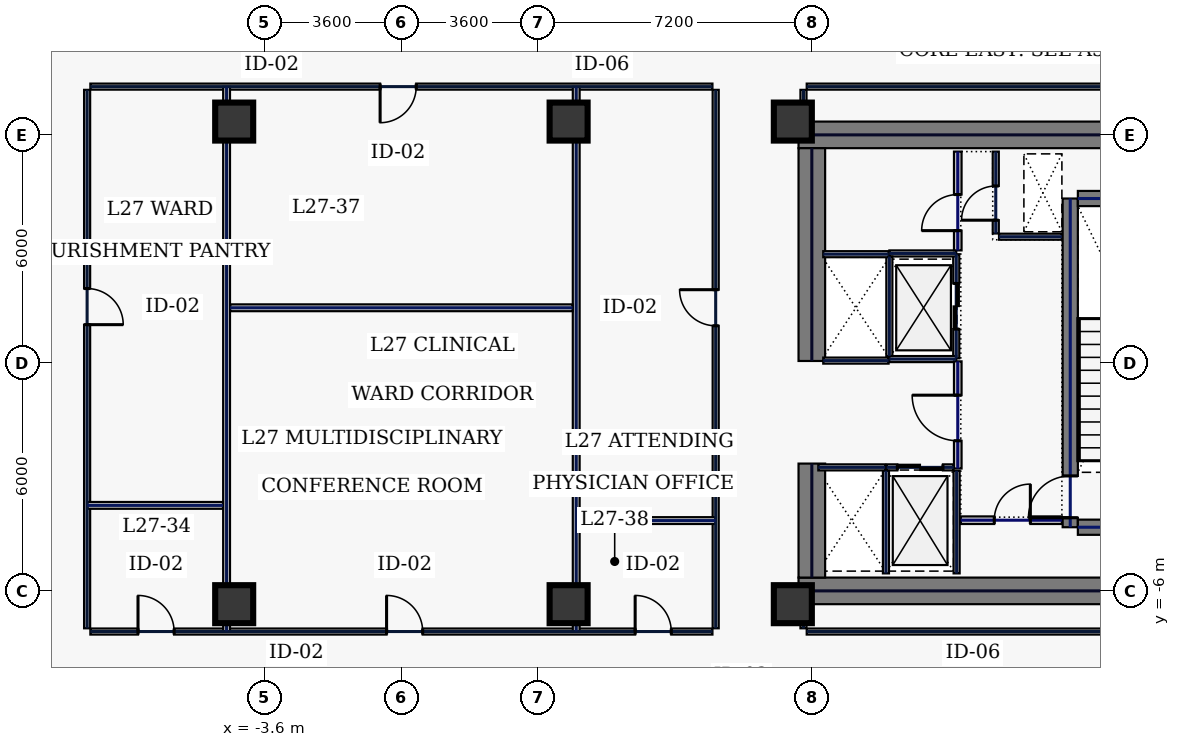
"""IFC4 building model, lengths in metres.
Left out: names, types, materials, properties, quantities, classifications, styles, units other than length and angle.
Written with IfcOpenShell. Run it as: python <this file> out.ifc"""

import sys

from ifc_helpers import new_model, si_unit, direction, frame, frame_2d, origin, origin_2d, place, context, subcontext, project, spatial, rectangle, hollow_rectangle, extrude, element, fill, save


model = new_model("IFC4")
c1 = context("Model", 3, precision=1e-05, world=origin(), true_north=direction((0.0, 1.0)))
c2 = subcontext(c1, "Body", "Model", "MODEL_VIEW")
j1 = project(units=[si_unit("LENGTHUNIT", "METRE"), si_unit("PLANEANGLEUNIT", "RADIAN")], contexts=[c1])
p1 = place(None, origin())
s1 = spatial("IfcSite", under=j1, at=p1, CompositionType="ELEMENT")
p2 = place(p1, origin())
s2 = spatial("IfcBuilding", under=s1, at=p2, CompositionType="ELEMENT")
p3 = place(p2, frame((0.0, 0.0, 121.4)))
s3 = spatial("IfcBuildingStorey", under=s2, at=p3, CompositionType="ELEMENT", Elevation=121.4)
for number, where, z_axis, x_axis in (
    (1, (10.45, 6.0, 0.0), (0.0, 0.0, 1.0), (1.0, 0.0, 0.0)),
    (2, (10.45, -6.0, 0.0), (0.0, 0.0, 1.0), (1.0, 0.0, 0.0)),
):
    element("IfcWall", number, at=place(p3, frame(where, z_axis=z_axis, x_axis=x_axis)), inside=s3, PredefinedType="SHEAR", context=c2, shape_type="SweptSolid", body=[
        extrude(rectangle(XDim=11.55, YDim=0.7, at=frame_2d((5.775, 0.0))), origin(), (0.0, 0.0, 1.0), 3.74),
    ])
p4 = place(p3, frame((10.8, -5.65, 0.0), z_axis=(0.0, 0.0, 1.0), x_axis=(0.0, 1.0, 0.0)))
e3 = element("IfcWall", 3, at=p4, inside=s3, PredefinedType="SHEAR", context=c2, shape_type="SweptSolid", body=[
    extrude(rectangle(XDim=3.0, YDim=0.7, at=frame_2d((1.5, 0.0))), origin(), (0.0, 0.0, 1.0), 3.74),
])
p5 = place(p3, frame((10.8, 0.05, 0.0), z_axis=(0.0, 0.0, 1.0), x_axis=(0.0, 1.0, 0.0)))
e4 = element("IfcWall", 4, at=p5, inside=s3, PredefinedType="SHEAR", context=c2, shape_type="SweptSolid", body=[
    extrude(rectangle(XDim=5.6, YDim=0.7, at=frame_2d((2.8, 0.0))), origin(), (0.0, 0.0, 1.0), 3.74),
])
p6 = place(p3, frame((17.6, -4.325, 0.0), z_axis=(0.0, 0.0, 1.0), x_axis=(0.0, 1.0, 0.0)))
e5 = element("IfcWall", 5, at=p6, inside=s3, PredefinedType="SHEAR", context=c2, shape_type="SweptSolid", body=[
    extrude(rectangle(XDim=8.65, YDim=0.4, at=frame_2d((4.325, 0.0))), origin(), (0.0, 0.0, 1.0), 3.74),
])
p7 = place(p6, frame((0.25, 0.0, 0.0)))
e6 = element("IfcOpeningElement", 6, at=p7, cuts=e5, PredefinedType="OPENING", context=c2, shape_type="SweptSolid", body=[
    extrude(rectangle(XDim=1.1, YDim=2.2, at=frame_2d((0.55, 1.1))), frame((0.0, 0.21, 0.0), z_axis=(0.0, -1.0, 0.0), x_axis=(1.0, 0.0, 0.0)), (0.0, 0.0, 1.0), 0.42),
])
for number, where, z_axis, x_axis in (
    (7, (17.8, -4.325, 0.0), (0.0, 0.0, 1.0), (1.0, 0.0, 0.0)),
    (8, (17.8, 4.325, 0.0), (0.0, 0.0, 1.0), (1.0, 0.0, 0.0)),
):
    element("IfcWall", number, at=place(p3, frame(where, z_axis=z_axis, x_axis=x_axis)), inside=s3, PredefinedType="SHEAR", context=c2, shape_type="SweptSolid", body=[
        extrude(rectangle(XDim=3.4, YDim=0.4, at=frame_2d((1.7, 0.0))), origin(), (0.0, 0.0, 1.0), 3.74),
    ])
for number, where, z_axis, x_axis in (
    (9, (10.3, -6.35, 0.0), (0.0, 0.0, 1.0), (1.0, 0.0, 0.0)),
    (10, (10.3, 6.35, 0.0), (0.0, 0.0, 1.0), (1.0, 0.0, 0.0)),
    (11, (-4.4, -6.35, 0.0), (0.0, 0.0, 1.0), (1.0, 0.0, 0.0)),
    (12, (4.4, -6.35, 0.0), (0.0, 0.0, 1.0), (1.0, 0.0, 0.0)),
    (13, (-4.4, 6.35, 0.0), (0.0, 0.0, 1.0), (1.0, 0.0, 0.0)),
    (14, (4.4, 6.35, 0.0), (0.0, 0.0, 1.0), (1.0, 0.0, 0.0)),
):
    element("IfcColumn", number, at=place(p3, frame(where, z_axis=z_axis, x_axis=x_axis)), inside=s3, PredefinedType="COLUMN", context=c2, shape_type="SweptSolid", body=[
        extrude(hollow_rectangle(XDim=1.0, YDim=1.0, WallThickness=0.045, at=origin_2d()), origin(), (0.0, 0.0, 1.0), 3.74),
    ])
p8 = place(p3, frame((14.6, 0.12, 0.0), z_axis=(0.0, 0.0, 1.0), x_axis=(0.0, 1.0, 0.0)))
e15 = element("IfcWall", 15, at=p8, inside=s3, PredefinedType="PARTITIONING", context=c2, shape_type="SweptSolid", body=[
    extrude(rectangle(XDim=2.74, YDim=0.16, at=frame_2d((1.37, 0.0))), origin(), (0.0, 0.0, 1.0), 3.74),
])
p9 = place(p8, frame((0.77, 0.0, 0.0)))
e16 = element("IfcOpeningElement", 16, at=p9, cuts=e15, PredefinedType="OPENING", context=c2, shape_type="SweptSolid", body=[
    extrude(rectangle(XDim=1.2, YDim=2.2, at=frame_2d((0.6, 1.1))), frame((0.0, 0.09, 0.0), z_axis=(0.0, -1.0, 0.0), x_axis=(1.0, 0.0, 0.0)), (0.0, 0.0, 1.0), 0.18),
])
for number, where, z_axis, x_axis in (
    (17, (12.84, 0.1, 0.0), (0.0, 0.0, 1.0), (1.0, 0.0, 0.0)),
    (18, (12.84, 2.88, 0.0), (0.0, 0.0, 1.0), (1.0, 0.0, 0.0)),
):
    element("IfcWall", number, at=place(p3, frame(where, z_axis=z_axis, x_axis=x_axis)), inside=s3, PredefinedType="PARTITIONING", context=c2, shape_type="SweptSolid", body=[
        extrude(rectangle(XDim=1.76, YDim=0.16, at=frame_2d((0.88, 0.0))), origin(), (0.0, 0.0, 1.0), 3.74),
    ])
p10 = place(p3, frame((12.84, 0.18, 0.0), z_axis=(0.0, 0.0, 1.0), x_axis=(0.0, 1.0, 0.0)))
e19 = element("IfcWall", 19, at=p10, inside=s3, PredefinedType="PARTITIONING", context=c2, shape_type="SweptSolid", body=[
    extrude(rectangle(XDim=2.62, YDim=0.16, at=frame_2d((1.31, 0.0))), origin(), (0.0, 0.0, 1.0), 3.74),
])
p11 = place(p3, frame((12.77, -2.75, 0.0), z_axis=(0.0, 0.0, 1.0), x_axis=(1.0, 0.0, 0.0)))
e20 = element("IfcWall", 20, at=p11, inside=s3, PredefinedType="PARTITIONING", context=c2, shape_type="SweptSolid", body=[
    extrude(rectangle(XDim=1.76, YDim=0.16, at=frame_2d((0.88, 0.0))), origin(), (0.0, 0.0, 1.0), 3.74),
])
p12 = place(p11, frame((0.28, 0.0, 0.0)))
e21 = element("IfcOpeningElement", 21, at=p12, cuts=e20, PredefinedType="OPENING", context=c2, shape_type="SweptSolid", body=[
    extrude(rectangle(XDim=1.2, YDim=2.2, at=frame_2d((0.6, 1.1))), frame((0.0, 0.09, 0.0), z_axis=(0.0, -1.0, 0.0), x_axis=(1.0, 0.0, 0.0)), (0.0, 0.0, 1.0), 0.18),
])
for number, where, z_axis, x_axis in (
    (22, (12.75, -5.54, 0.0), (0.0, 0.0, 1.0), (0.0, 1.0, 0.0)),
    (23, (14.61, -5.54, 0.0), (0.0, 0.0, 1.0), (0.0, 1.0, 0.0)),
):
    element("IfcWall", number, at=place(p3, frame(where, z_axis=z_axis, x_axis=x_axis)), inside=s3, PredefinedType="PARTITIONING", context=c2, shape_type="SweptSolid", body=[
        extrude(rectangle(XDim=2.7, YDim=0.16, at=frame_2d((1.35, 0.0))), origin(), (0.0, 0.0, 1.0), 3.74),
    ])
p13 = place(p3, frame((10.97, -2.75, 0.0), z_axis=(0.0, 0.0, 1.0), x_axis=(1.0, 0.0, 0.0)))
e24 = element("IfcWall", 24, at=p13, inside=s3, PredefinedType="PARTITIONING", context=c2, shape_type="SweptSolid", body=[
    extrude(rectangle(XDim=1.76, YDim=0.16, at=frame_2d((0.88, 0.0))), origin(), (0.0, 0.0, 1.0), 3.74),
])
for number, where, z_axis, x_axis in (
    (25, (11.1, 0.06, 0.0), (0.0, 0.0, 1.0), (1.0, 0.0, 0.0)),
    (26, (11.1, 2.86, 0.0), (0.0, 0.0, 1.0), (1.0, 0.0, 0.0)),
):
    element("IfcWall", number, at=place(p3, frame(where, z_axis=z_axis, x_axis=x_axis)), inside=s3, PredefinedType="PARTITIONING", context=c2, shape_type="SweptSolid", body=[
        extrude(rectangle(XDim=1.72, YDim=0.16, at=frame_2d((0.86, 0.0))), origin(), (0.0, 0.0, 1.0), 3.74),
    ])
p14 = place(p3, frame((15.64, 3.405, 0.0), z_axis=(0.0, 0.0, 1.0), x_axis=(0.0, 1.0, 0.0)))
e27 = element("IfcWall", 27, at=p14, inside=s3, PredefinedType="PARTITIONING", context=c2, shape_type="SweptSolid", body=[
    extrude(rectangle(XDim=2.155, YDim=0.16, at=frame_2d((1.078, 0.0))), origin(), (0.0, 0.0, 1.0), 3.74),
])
p15 = place(p14, frame((0.35, 0.0, 0.0)))
e28 = element("IfcOpeningElement", 28, at=p15, cuts=e27, PredefinedType="OPENING", context=c2, shape_type="SweptSolid", body=[
    extrude(rectangle(XDim=0.9, YDim=2.2, at=frame_2d((0.45, 1.1))), frame((0.0, 0.09, 0.0), z_axis=(0.0, -1.0, 0.0), x_axis=(1.0, 0.0, 0.0)), (0.0, 0.0, 1.0), 0.18),
])
p16 = place(p3, frame((15.725, 3.32, 0.0), z_axis=(0.0, 0.0, 1.0), x_axis=(1.0, 0.0, 0.0)))
e29 = element("IfcWall", 29, at=p16, inside=s3, PredefinedType="PARTITIONING", context=c2, shape_type="SweptSolid", body=[
    extrude(rectangle(XDim=1.655, YDim=0.16, at=frame_2d((0.827, 0.0))), origin(), (0.0, 0.0, 1.0), 3.74),
])
p17 = place(p3, frame((14.72, -4.14, 0.0), z_axis=(0.0, 0.0, 1.0), x_axis=(1.0, 0.0, 0.0)))
e30 = element("IfcWall", 30, at=p17, inside=s3, PredefinedType="SOLIDWALL", context=c2, shape_type="SweptSolid", body=[
    extrude(rectangle(XDim=2.66, YDim=0.2, at=frame_2d((1.33, 0.0))), origin(), (0.0, 0.0, 1.0), 3.74),
])
p18 = place(p17, frame((0.88, 0.0, 0.0)))
e31 = element("IfcOpeningElement", 31, at=p18, cuts=e30, PredefinedType="OPENING", context=c2, shape_type="SweptSolid", body=[
    extrude(rectangle(XDim=0.95, YDim=2.2, at=frame_2d((0.475, 1.1))), frame((0.0, 0.11, 0.0), z_axis=(0.0, -1.0, 0.0), x_axis=(1.0, 0.0, 0.0)), (0.0, 0.0, 1.0), 0.22),
])
p19 = place(p3, frame((14.64, 2.96, 0.0), z_axis=(0.0, 0.0, 1.0), x_axis=(0.0, 1.0, 0.0)))
e32 = element("IfcWall", 32, at=p19, inside=s3, PredefinedType="SOLIDWALL", context=c2, shape_type="SweptSolid", body=[
    extrude(rectangle(XDim=2.6, YDim=0.2, at=frame_2d((1.3, 0.0))), origin(), (0.0, 0.0, 1.0), 3.74),
])
p20 = place(p19, frame((0.52, 0.0, 0.0)))
e33 = element("IfcOpeningElement", 33, at=p20, cuts=e32, PredefinedType="OPENING", context=c2, shape_type="SweptSolid", body=[
    extrude(rectangle(XDim=0.95, YDim=2.2, at=frame_2d((0.475, 1.1))), frame((0.0, 0.11, 0.0), z_axis=(0.0, -1.0, 0.0), x_axis=(1.0, 0.0, 0.0)), (0.0, 0.0, 1.0), 0.22),
])
p21 = place(p3, frame((14.64, -2.78, 0.0), z_axis=(0.0, 0.0, 1.0), x_axis=(0.0, 1.0, 0.0)))
e34 = element("IfcWall", 34, at=p21, inside=s3, PredefinedType="SOLIDWALL", context=c2, shape_type="SweptSolid", body=[
    extrude(rectangle(XDim=2.82, YDim=0.2, at=frame_2d((1.41, 0.0))), origin(), (0.0, 0.0, 1.0), 3.74),
])
p22 = place(p21, frame((0.73, 0.0, 0.0)))
e35 = element("IfcOpeningElement", 35, at=p22, cuts=e34, PredefinedType="OPENING", context=c2, shape_type="SweptSolid", body=[
    extrude(rectangle(XDim=1.2, YDim=2.2, at=frame_2d((0.6, 1.1))), frame((0.0, 0.11, 0.0), z_axis=(0.0, -1.0, 0.0), x_axis=(1.0, 0.0, 0.0)), (0.0, 0.0, 1.0), 0.22),
])
p23 = place(p3, frame((25.235, 7.27, 0.0), z_axis=(0.0, 0.0, 1.0), x_axis=(-1.0, 0.0, 0.0)))
e36 = element("IfcWall", 36, at=p23, inside=s3, PredefinedType="PARTITIONING", context=c2, shape_type="SweptSolid", body=[
    extrude(rectangle(XDim=14.57, YDim=0.16, at=frame_2d((7.285, 0.0))), origin(), (0.0, 0.0, 1.0), 3.74),
])
p24 = place(p3, frame((10.58, 7.185, 0.0), z_axis=(0.0, 0.0, 1.0), x_axis=(0.0, -1.0, 0.0)))
e37 = element("IfcWall", 37, at=p24, inside=s3, PredefinedType="PARTITIONING", context=c2, shape_type="SweptSolid", body=[
    extrude(rectangle(XDim=0.765, YDim=0.16, at=frame_2d((0.383, 0.0))), origin(), (0.0, 0.0, 1.0), 3.74),
])
p25 = place(p3, frame((10.58, -6.42, 0.0), z_axis=(0.0, 0.0, 1.0), x_axis=(0.0, -1.0, 0.0)))
e38 = element("IfcWall", 38, at=p25, inside=s3, PredefinedType="PARTITIONING", context=c2, shape_type="SweptSolid", body=[
    extrude(rectangle(XDim=0.565, YDim=0.16, at=frame_2d((0.283, 0.0))), origin(), (0.0, 0.0, 1.0), 3.74),
])
p26 = place(p3, frame((10.665, -7.07, 0.0), z_axis=(0.0, 0.0, 1.0), x_axis=(1.0, 0.0, 0.0)))
e39 = element("IfcWall", 39, at=p26, inside=s3, PredefinedType="PARTITIONING", context=c2, shape_type="SweptSolid", body=[
    extrude(rectangle(XDim=14.57, YDim=0.16, at=frame_2d((7.285, 0.0))), origin(), (0.0, 0.0, 1.0), 3.74),
])
p27 = place(p3, frame((8.27, -6.985, 0.0), z_axis=(0.0, 0.0, 1.0), x_axis=(0.0, 1.0, 0.0)))
e40 = element("IfcWall", 40, at=p27, inside=s3, PredefinedType="PARTITIONING", context=c2, shape_type="SweptSolid", body=[
    extrude(rectangle(XDim=14.17, YDim=0.16, at=frame_2d((7.085, 0.0))), origin(), (0.0, 0.0, 1.0), 3.74),
])
p28 = place(p27, frame((7.961, 0.0, 0.0)))
e41 = element("IfcOpeningElement", 41, at=p28, cuts=e40, PredefinedType="OPENING", context=c2, shape_type="SweptSolid", body=[
    extrude(rectangle(XDim=0.95, YDim=2.2, at=frame_2d((0.475, 1.1))), frame((0.0, 0.09, 0.0), z_axis=(0.0, -1.0, 0.0), x_axis=(1.0, 0.0, 0.0)), (0.0, 0.0, 1.0), 0.18),
])
p29 = place(p3, frame((8.185, 7.27, 0.0), z_axis=(0.0, 0.0, 1.0), x_axis=(-1.0, 0.0, 0.0)))
e42 = element("IfcWall", 42, at=p29, inside=s3, PredefinedType="PARTITIONING", context=c2, shape_type="SweptSolid", body=[
    extrude(rectangle(XDim=16.37, YDim=0.16, at=frame_2d((8.185, 0.0))), origin(), (0.0, 0.0, 1.0), 3.74),
])
p30 = place(p29, frame((7.795, 0.0, 0.0)))
e43 = element("IfcOpeningElement", 43, at=p30, cuts=e42, PredefinedType="OPENING", context=c2, shape_type="SweptSolid", body=[
    extrude(rectangle(XDim=0.95, YDim=2.2, at=frame_2d((0.475, 1.1))), frame((0.0, 0.09, 0.0), z_axis=(0.0, -1.0, 0.0), x_axis=(1.0, 0.0, 0.0)), (0.0, 0.0, 1.0), 0.18),
])
p31 = place(p3, frame((-8.27, 7.185, 0.0), z_axis=(0.0, 0.0, 1.0), x_axis=(0.0, -1.0, 0.0)))
e44 = element("IfcWall", 44, at=p31, inside=s3, PredefinedType="PARTITIONING", context=c2, shape_type="SweptSolid", body=[
    extrude(rectangle(XDim=14.17, YDim=0.16, at=frame_2d((7.085, 0.0))), origin(), (0.0, 0.0, 1.0), 3.74),
])
p32 = place(p31, frame((5.229, 0.0, 0.0)))
e45 = element("IfcOpeningElement", 45, at=p32, cuts=e44, PredefinedType="OPENING", context=c2, shape_type="SweptSolid", body=[
    extrude(rectangle(XDim=0.95, YDim=2.2, at=frame_2d((0.475, 1.1))), frame((0.0, 0.09, 0.0), z_axis=(0.0, -1.0, 0.0), x_axis=(1.0, 0.0, 0.0)), (0.0, 0.0, 1.0), 0.18),
])
p33 = place(p3, frame((-8.185, -7.07, 0.0), z_axis=(0.0, 0.0, 1.0), x_axis=(1.0, 0.0, 0.0)))
e46 = element("IfcWall", 46, at=p33, inside=s3, PredefinedType="PARTITIONING", context=c2, shape_type="SweptSolid", body=[
    extrude(rectangle(XDim=16.37, YDim=0.16, at=frame_2d((8.185, 0.0))), origin(), (0.0, 0.0, 1.0), 3.74),
])
p34 = place(p33, frame((1.254, 0.0, 0.0)))
e47 = element("IfcOpeningElement", 47, at=p34, cuts=e46, PredefinedType="OPENING", context=c2, shape_type="SweptSolid", body=[
    extrude(rectangle(XDim=0.95, YDim=2.2, at=frame_2d((0.475, 1.1))), frame((0.0, 0.09, 0.0), z_axis=(0.0, -1.0, 0.0), x_axis=(1.0, 0.0, 0.0)), (0.0, 0.0, 1.0), 0.18),
])
p35 = place(p33, frame((7.795, 0.0, 0.0)))
e48 = element("IfcOpeningElement", 48, at=p35, cuts=e46, PredefinedType="OPENING", context=c2, shape_type="SweptSolid", body=[
    extrude(rectangle(XDim=0.95, YDim=2.2, at=frame_2d((0.475, 1.1))), frame((0.0, 0.09, 0.0), z_axis=(0.0, -1.0, 0.0), x_axis=(1.0, 0.0, 0.0)), (0.0, 0.0, 1.0), 0.18),
])
p36 = place(p33, frame((14.336, 0.0, 0.0)))
e49 = element("IfcOpeningElement", 49, at=p36, cuts=e46, PredefinedType="OPENING", context=c2, shape_type="SweptSolid", body=[
    extrude(rectangle(XDim=0.95, YDim=2.2, at=frame_2d((0.475, 1.1))), frame((0.0, 0.09, 0.0), z_axis=(0.0, -1.0, 0.0), x_axis=(1.0, 0.0, 0.0)), (0.0, 0.0, 1.0), 0.18),
])
for number, where, z_axis, x_axis in (
    (50, (-4.6, -7.065, 0.0), (0.0, 0.0, 1.0), (0.0, 1.0, 0.0)),
    (51, (4.6, -7.065, 0.0), (0.0, 0.0, 1.0), (0.0, 1.0, 0.0)),
):
    element("IfcWall", number, at=place(p3, frame(where, z_axis=z_axis, x_axis=x_axis)), inside=s3, PredefinedType="PARTITIONING", context=c2, shape_type="SweptSolid", body=[
        extrude(rectangle(XDim=14.33, YDim=0.18, at=frame_2d((7.165, 0.0))), origin(), (0.0, 0.0, 1.0), 2.935),
    ])
p37 = place(p3, frame((-4.505, 1.45, 0.0), z_axis=(0.0, 0.0, 1.0), x_axis=(1.0, 0.0, 0.0)))
e52 = element("IfcWall", 52, at=p37, inside=s3, PredefinedType="PARTITIONING", context=c2, shape_type="SweptSolid", body=[
    extrude(rectangle(XDim=9.01, YDim=0.18, at=frame_2d((4.505, 0.0))), origin(), (0.0, 0.0, 1.0), 3.74),
])
for number, where, z_axis, x_axis in (
    (53, (-8.265, -3.75, 0.0), (0.0, 0.0, 1.0), (1.0, 0.0, 0.0)),
    (54, (4.695, -4.15, 0.0), (0.0, 0.0, 1.0), (1.0, 0.0, 0.0)),
):
    element("IfcWall", number, at=place(p3, frame(where, z_axis=z_axis, x_axis=x_axis)), inside=s3, PredefinedType="PARTITIONING", context=c2, shape_type="SweptSolid", body=[
        extrude(rectangle(XDim=3.57, YDim=0.18, at=frame_2d((1.785, 0.0))), origin(), (0.0, 0.0, 1.0), 3.74),
    ])
p38 = place(p7, origin())
e55 = element("IfcDoor", 55, at=p38, inside=s3, OperationType="SINGLE_SWING_LEFT", PredefinedType="DOOR", context=c2, shape_type="SweptSolid", body=[
    extrude(rectangle(XDim=1.1, YDim=2.2, at=frame_2d((0.55, 1.1))), frame((0.0, 0.025, 0.0), z_axis=(0.0, -1.0, 0.0), x_axis=(1.0, 0.0, 0.0)), (0.0, 0.0, 1.0), 0.05),
])
fill(e6, e55)
p39 = place(p9, origin())
e56 = element("IfcDoor", 56, at=p39, inside=s3, OperationType="SLIDING_TO_LEFT", PredefinedType="DOOR", context=c2, shape_type="SweptSolid", body=[
    extrude(rectangle(XDim=1.2, YDim=2.2, at=frame_2d((0.6, 1.1))), frame((0.0, 0.025, 0.0), z_axis=(0.0, -1.0, 0.0), x_axis=(1.0, 0.0, 0.0)), (0.0, 0.0, 1.0), 0.05),
])
fill(e16, e56)
p40 = place(p12, origin())
e57 = element("IfcDoor", 57, at=p40, inside=s3, OperationType="SLIDING_TO_LEFT", PredefinedType="DOOR", context=c2, shape_type="SweptSolid", body=[
    extrude(rectangle(XDim=1.2, YDim=2.2, at=frame_2d((0.6, 1.1))), frame((0.0, 0.025, 0.0), z_axis=(0.0, -1.0, 0.0), x_axis=(1.0, 0.0, 0.0)), (0.0, 0.0, 1.0), 0.05),
])
fill(e21, e57)
p41 = place(p15, origin())
e58 = element("IfcDoor", 58, at=p41, inside=s3, OperationType="SINGLE_SWING_LEFT", PredefinedType="DOOR", context=c2, shape_type="SweptSolid", body=[
    extrude(rectangle(XDim=0.9, YDim=2.2, at=frame_2d((0.45, 1.1))), frame((0.0, 0.025, 0.0), z_axis=(0.0, -1.0, 0.0), x_axis=(1.0, 0.0, 0.0)), (0.0, 0.0, 1.0), 0.05),
])
fill(e28, e58)
p42 = place(p18, origin())
e59 = element("IfcDoor", 59, at=p42, inside=s3, OperationType="SINGLE_SWING_RIGHT", PredefinedType="DOOR", context=c2, shape_type="SweptSolid", body=[
    extrude(rectangle(XDim=0.95, YDim=2.2, at=frame_2d((0.475, 1.1))), frame((0.0, 0.025, 0.0), z_axis=(0.0, -1.0, 0.0), x_axis=(1.0, 0.0, 0.0)), (0.0, 0.0, 1.0), 0.05),
])
fill(e31, e59)
p43 = place(p20, origin())
e60 = element("IfcDoor", 60, at=p43, inside=s3, OperationType="SINGLE_SWING_LEFT", PredefinedType="DOOR", context=c2, shape_type="SweptSolid", body=[
    extrude(rectangle(XDim=0.95, YDim=2.2, at=frame_2d((0.475, 1.1))), frame((0.0, 0.025, 0.0), z_axis=(0.0, -1.0, 0.0), x_axis=(1.0, 0.0, 0.0)), (0.0, 0.0, 1.0), 0.05),
])
fill(e33, e60)
p44 = place(p22, origin())
e61 = element("IfcDoor", 61, at=p44, inside=s3, OperationType="SINGLE_SWING_RIGHT", PredefinedType="DOOR", context=c2, shape_type="SweptSolid", body=[
    extrude(rectangle(XDim=1.2, YDim=2.2, at=frame_2d((0.6, 1.1))), frame((0.0, 0.025, 0.0), z_axis=(0.0, -1.0, 0.0), x_axis=(1.0, 0.0, 0.0)), (0.0, 0.0, 1.0), 0.05),
])
fill(e35, e61)
p45 = place(p34, origin())
e62 = element("IfcDoor", 62, at=p45, inside=s3, OperationType="SINGLE_SWING_LEFT", PredefinedType="DOOR", context=c2, shape_type="SweptSolid", body=[
    extrude(rectangle(XDim=0.95, YDim=2.2, at=frame_2d((0.475, 1.1))), frame((0.0, 0.025, 0.0), z_axis=(0.0, -1.0, 0.0), x_axis=(1.0, 0.0, 0.0)), (0.0, 0.0, 1.0), 0.05),
])
fill(e47, e62)
p46 = place(p32, origin())
e63 = element("IfcDoor", 63, at=p46, inside=s3, OperationType="SINGLE_SWING_RIGHT", PredefinedType="DOOR", context=c2, shape_type="SweptSolid", body=[
    extrude(rectangle(XDim=0.95, YDim=2.2, at=frame_2d((0.475, 1.1))), frame((0.0, 0.025, 0.0), z_axis=(0.0, -1.0, 0.0), x_axis=(1.0, 0.0, 0.0)), (0.0, 0.0, 1.0), 0.05),
])
fill(e45, e63)
p47 = place(p35, origin())
e64 = element("IfcDoor", 64, at=p47, inside=s3, OperationType="SINGLE_SWING_LEFT", PredefinedType="DOOR", context=c2, shape_type="SweptSolid", body=[
    extrude(rectangle(XDim=0.95, YDim=2.2, at=frame_2d((0.475, 1.1))), frame((0.0, 0.025, 0.0), z_axis=(0.0, -1.0, 0.0), x_axis=(1.0, 0.0, 0.0)), (0.0, 0.0, 1.0), 0.05),
])
fill(e48, e64)
p48 = place(p30, origin())
e65 = element("IfcDoor", 65, at=p48, inside=s3, OperationType="SINGLE_SWING_RIGHT", PredefinedType="DOOR", context=c2, shape_type="SweptSolid", body=[
    extrude(rectangle(XDim=0.95, YDim=2.2, at=frame_2d((0.475, 1.1))), frame((0.0, 0.025, 0.0), z_axis=(0.0, -1.0, 0.0), x_axis=(1.0, 0.0, 0.0)), (0.0, 0.0, 1.0), 0.05),
])
fill(e43, e65)
p49 = place(p36, origin())
e66 = element("IfcDoor", 66, at=p49, inside=s3, OperationType="SINGLE_SWING_LEFT", PredefinedType="DOOR", context=c2, shape_type="SweptSolid", body=[
    extrude(rectangle(XDim=0.95, YDim=2.2, at=frame_2d((0.475, 1.1))), frame((0.0, 0.025, 0.0), z_axis=(0.0, -1.0, 0.0), x_axis=(1.0, 0.0, 0.0)), (0.0, 0.0, 1.0), 0.05),
])
fill(e49, e66)
p50 = place(p28, origin())
e67 = element("IfcDoor", 67, at=p50, inside=s3, OperationType="SINGLE_SWING_RIGHT", PredefinedType="DOOR", context=c2, shape_type="SweptSolid", body=[
    extrude(rectangle(XDim=0.95, YDim=2.2, at=frame_2d((0.475, 1.1))), frame((0.0, 0.025, 0.0), z_axis=(0.0, -1.0, 0.0), x_axis=(1.0, 0.0, 0.0)), (0.0, 0.0, 1.0), 0.05),
])
fill(e41, e67)
save(model, sys.argv[1])
